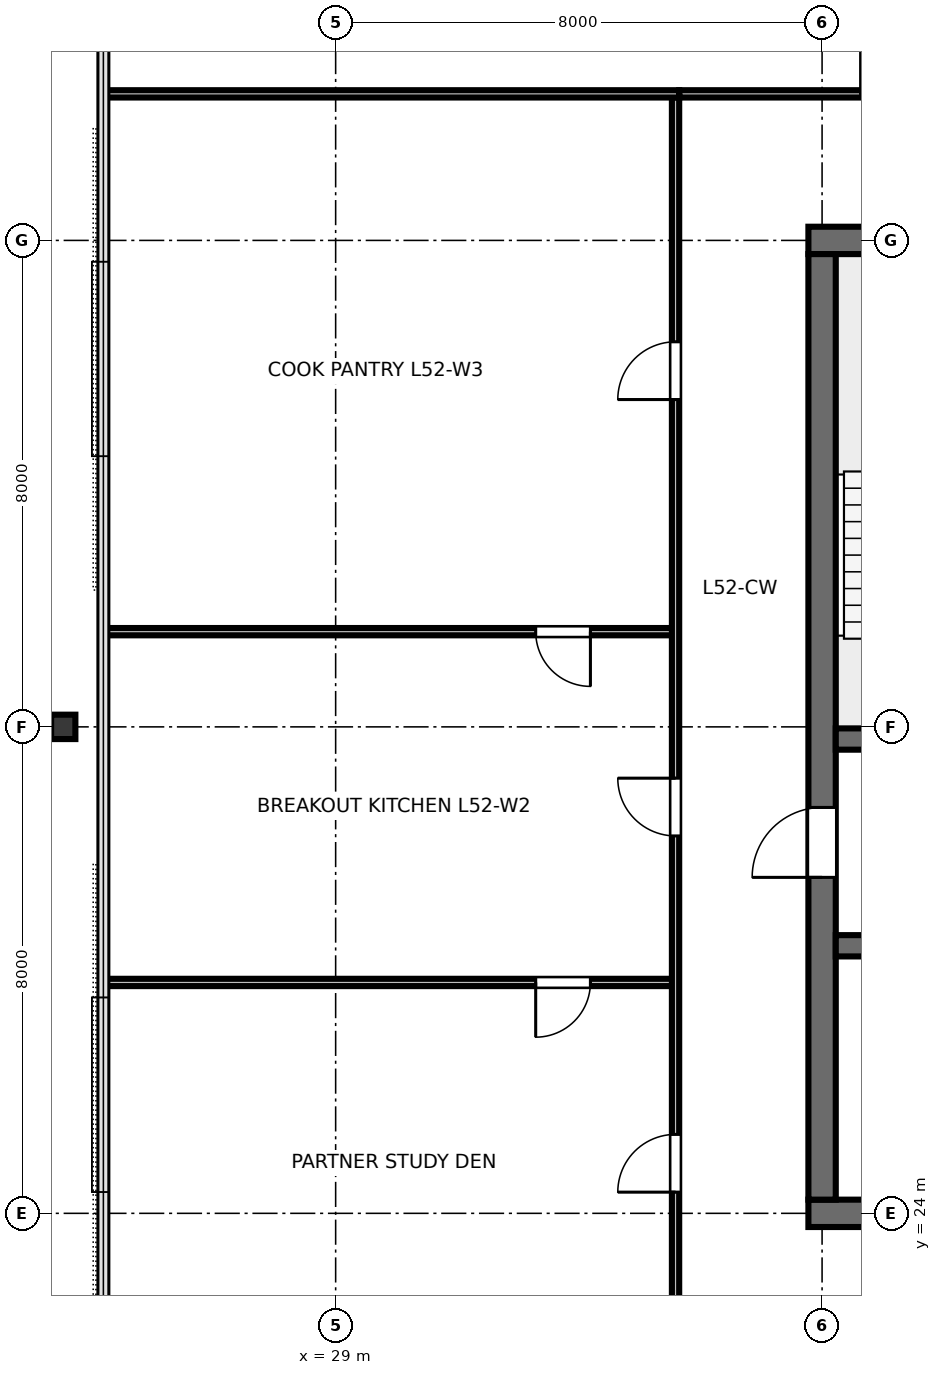
"""IFC4 building model, lengths in metres.
Left out: names, types, materials, properties, quantities, classifications, styles, units other than length and angle.
Written with IfcOpenShell. Run it as: python <this file> out.ifc"""

import sys

from ifc_helpers import new_model, si_unit, direction, frame, frame_2d, origin, origin_2d, place, context, subcontext, project, spatial, rectangle, i_section, extrude, element, fill, save


model = new_model("IFC4")
c1 = context("Model", 3, precision=1e-05, world=origin(), true_north=direction((0.0, 1.0)))
c2 = subcontext(c1, "Body", "Model", "MODEL_VIEW")
j1 = project(units=[si_unit("LENGTHUNIT", "METRE"), si_unit("PLANEANGLEUNIT", "RADIAN")], contexts=[c1])
p1 = place(None, origin())
s1 = spatial("IfcSite", under=j1, at=p1, CompositionType="ELEMENT")
p2 = place(p1, origin())
s2 = spatial("IfcBuilding", under=s1, at=p2, CompositionType="ELEMENT")
p3 = place(p2, frame((0.0, 0.0, 198.6)))
s3 = spatial("IfcBuildingStorey", under=s2, at=p3, CompositionType="ELEMENT", Elevation=198.6)
p4 = place(p3, frame((36.775, 24.0, 0.0), z_axis=(0.0, 0.0, 1.0), x_axis=(1.0, 0.0, 0.0)))
e1 = element("IfcWall", 1, at=p4, inside=s3, PredefinedType="SHEAR", context=c2, shape_type="SweptSolid", body=[
    extrude(rectangle(XDim=18.45, YDim=0.45, at=frame_2d((9.225, 0.0))), origin(), (0.0, 0.0, 1.0), 3.36),
])
p5 = place(p4, frame((13.425, 0.0, 0.0)))
e2 = element("IfcOpeningElement", 2, at=p5, cuts=e1, PredefinedType="OPENING", context=c2, shape_type="SweptSolid", body=[
    extrude(rectangle(XDim=1.6, YDim=2.15, at=frame_2d((0.8, 1.075))), frame((0.0, 0.235, 0.0), z_axis=(0.0, -1.0, 0.0), x_axis=(1.0, 0.0, 0.0)), (0.0, 0.0, 1.0), 0.47),
])
p6 = place(p3, frame((36.775, 40.0, 0.0), z_axis=(0.0, 0.0, 1.0), x_axis=(1.0, 0.0, 0.0)))
e3 = element("IfcWall", 3, at=p6, inside=s3, PredefinedType="SHEAR", context=c2, shape_type="SweptSolid", body=[
    extrude(rectangle(XDim=18.45, YDim=0.45, at=frame_2d((9.225, 0.0))), origin(), (0.0, 0.0, 1.0), 3.36),
])
p7 = place(p6, frame((10.525, 0.0, 0.0)))
e4 = element("IfcOpeningElement", 4, at=p7, cuts=e3, PredefinedType="OPENING", context=c2, shape_type="SweptSolid", body=[
    extrude(rectangle(XDim=1.0, YDim=2.15, at=frame_2d((0.5, 1.075))), frame((0.0, 0.235, 0.0), z_axis=(0.0, -1.0, 0.0), x_axis=(1.0, 0.0, 0.0)), (0.0, 0.0, 1.0), 0.47),
])
p8 = place(p3, frame((37.0, 24.225, 0.0), z_axis=(0.0, 0.0, 1.0), x_axis=(0.0, 1.0, 0.0)))
e5 = element("IfcWall", 5, at=p8, inside=s3, PredefinedType="SHEAR", context=c2, shape_type="SweptSolid", body=[
    extrude(rectangle(XDim=15.55, YDim=0.45, at=frame_2d((7.775, 0.0))), origin(), (0.0, 0.0, 1.0), 3.36),
])
p9 = place(p8, frame((5.3, 0.0, 0.0)))
e6 = element("IfcOpeningElement", 6, at=p9, cuts=e5, PredefinedType="OPENING", context=c2, shape_type="SweptSolid", body=[
    extrude(rectangle(XDim=1.15, YDim=2.15, at=frame_2d((0.575, 1.075))), frame((0.0, 0.235, 0.0), z_axis=(0.0, -1.0, 0.0), x_axis=(1.0, 0.0, 0.0)), (0.0, 0.0, 1.0), 0.47),
])
p10 = place(p3, frame((37.225, 31.8, 0.0), z_axis=(0.0, 0.0, 1.0), x_axis=(1.0, 0.0, 0.0)))
e7 = element("IfcWall", 7, at=p10, inside=s3, PredefinedType="SHEAR", context=c2, shape_type="SweptSolid", body=[
    extrude(rectangle(XDim=17.55, YDim=0.35, at=frame_2d((8.775, 0.0))), origin(), (0.0, 0.0, 1.0), 3.36),
])
p11 = place(p10, frame((0.825, 0.0, 0.0)))
e8 = element("IfcOpeningElement", 8, at=p11, cuts=e7, PredefinedType="OPENING", context=c2, shape_type="SweptSolid", body=[
    extrude(rectangle(XDim=1.1, YDim=2.15, at=frame_2d((0.55, 1.075))), frame((0.0, 0.185, 0.0), z_axis=(0.0, -1.0, 0.0), x_axis=(1.0, 0.0, 0.0)), (0.0, 0.0, 1.0), 0.37),
])
p12 = place(p10, frame((14.725, 0.0, 0.0)))
e9 = element("IfcOpeningElement", 9, at=p12, cuts=e7, PredefinedType="OPENING", context=c2, shape_type="SweptSolid", body=[
    extrude(rectangle(XDim=1.1, YDim=2.15, at=frame_2d((0.55, 1.075))), frame((0.0, 0.185, 0.0), z_axis=(0.0, -1.0, 0.0), x_axis=(1.0, 0.0, 0.0)), (0.0, 0.0, 1.0), 0.37),
])
p13 = place(p3, frame((37.225, 28.4, 0.0), z_axis=(0.0, 0.0, 1.0), x_axis=(1.0, 0.0, 0.0)))
e10 = element("IfcWall", 10, at=p13, inside=s3, PredefinedType="SHEAR", context=c2, shape_type="SweptSolid", body=[
    extrude(rectangle(XDim=17.55, YDim=0.35, at=frame_2d((8.775, 0.0))), origin(), (0.0, 0.0, 1.0), 3.36),
])
p14 = place(p3, frame((24.52, 32.0, 0.0), z_axis=(0.0, 0.0, 1.0), x_axis=(0.0, 1.0, 0.0)))
e11 = element("IfcColumn", 11, at=p14, inside=s3, PredefinedType="COLUMN", context=c2, shape_type="SweptSolid", body=[
    extrude(i_section(OverallWidth=0.401, OverallDepth=0.399, WebThickness=0.025, FlangeThickness=0.04, FilletRadius=0.025, at=origin_2d()), origin(), (0.0, 0.0, 1.0), 3.373),
])
p15 = place(p3, frame((34.65, 42.41, 0.0), z_axis=(0.0, 0.0, 1.0), x_axis=(1.0, 0.0, 0.0)))
e12 = element("IfcWall", 12, at=p15, inside=s3, PredefinedType="PARTITIONING", context=c2, shape_type="SweptSolid", body=[
    extrude(rectangle(XDim=10.33, YDim=0.12, at=frame_2d((5.165, 0.0))), origin(), (0.0, 0.0, 1.0), 2.655),
])
p16 = place(p15, frame((2.984, 0.0, 0.0)))
e13 = element("IfcOpeningElement", 13, at=p16, cuts=e12, PredefinedType="OPENING", context=c2, shape_type="SweptSolid", body=[
    extrude(rectangle(XDim=0.95, YDim=2.15, at=frame_2d((0.475, 1.075))), frame((0.0, 0.07, 0.0), z_axis=(0.0, -1.0, 0.0), x_axis=(1.0, 0.0, 0.0)), (0.0, 0.0, 1.0), 0.14),
])
p17 = place(p15, frame((8.079, 0.0, 0.0)))
e14 = element("IfcOpeningElement", 14, at=p17, cuts=e12, PredefinedType="OPENING", context=c2, shape_type="SweptSolid", body=[
    extrude(rectangle(XDim=0.95, YDim=2.15, at=frame_2d((0.475, 1.075))), frame((0.0, 0.07, 0.0), z_axis=(0.0, -1.0, 0.0), x_axis=(1.0, 0.0, 0.0)), (0.0, 0.0, 1.0), 0.14),
])
p18 = place(p3, frame((34.59, 27.797, 0.0), z_axis=(0.0, 0.0, 1.0), x_axis=(-1.0, 0.0, 0.0)))
e15 = element("IfcWall", 15, at=p18, inside=s3, PredefinedType="PARTITIONING", context=c2, shape_type="SweptSolid", body=[
    extrude(rectangle(XDim=9.41, YDim=0.12, at=frame_2d((4.705, 0.0))), origin(), (0.0, 0.0, 1.0), 2.655),
])
p19 = place(p18, frame((1.4, 0.0, 0.0)))
e16 = element("IfcOpeningElement", 16, at=p19, cuts=e15, PredefinedType="OPENING", context=c2, shape_type="SweptSolid", body=[
    extrude(rectangle(XDim=0.9, YDim=2.15, at=frame_2d((0.45, 1.075))), frame((0.0, 0.07, 0.0), z_axis=(0.0, -1.0, 0.0), x_axis=(1.0, 0.0, 0.0)), (0.0, 0.0, 1.0), 0.14),
])
p20 = place(p3, frame((34.59, 33.566, 0.0), z_axis=(0.0, 0.0, 1.0), x_axis=(-1.0, 0.0, 0.0)))
e17 = element("IfcWall", 17, at=p20, inside=s3, PredefinedType="PARTITIONING", context=c2, shape_type="SweptSolid", body=[
    extrude(rectangle(XDim=9.41, YDim=0.12, at=frame_2d((4.705, 0.0))), origin(), (0.0, 0.0, 1.0), 2.655),
])
p21 = place(p20, frame((1.4, 0.0, 0.0)))
e18 = element("IfcOpeningElement", 18, at=p21, cuts=e17, PredefinedType="OPENING", context=c2, shape_type="SweptSolid", body=[
    extrude(rectangle(XDim=0.9, YDim=2.15, at=frame_2d((0.45, 1.075))), frame((0.0, 0.07, 0.0), z_axis=(0.0, -1.0, 0.0), x_axis=(1.0, 0.0, 0.0)), (0.0, 0.0, 1.0), 0.14),
])
p22 = place(p3, frame((34.59, 21.65, 0.0), z_axis=(0.0, 0.0, 1.0), x_axis=(0.0, 1.0, 0.0)))
e19 = element("IfcWall", 19, at=p22, inside=s3, PredefinedType="PARTITIONING", context=c2, shape_type="SweptSolid", body=[
    extrude(rectangle(XDim=20.7, YDim=0.12, at=frame_2d((10.35, 0.0))), origin(), (0.0, 0.0, 1.0), 2.655),
])
p23 = place(p22, frame((2.698, 0.0, 0.0)))
e20 = element("IfcOpeningElement", 20, at=p23, cuts=e19, PredefinedType="OPENING", context=c2, shape_type="SweptSolid", body=[
    extrude(rectangle(XDim=0.95, YDim=2.15, at=frame_2d((0.475, 1.075))), frame((0.0, 0.07, 0.0), z_axis=(0.0, -1.0, 0.0), x_axis=(1.0, 0.0, 0.0)), (0.0, 0.0, 1.0), 0.14),
])
p24 = place(p22, frame((8.556, 0.0, 0.0)))
e21 = element("IfcOpeningElement", 21, at=p24, cuts=e19, PredefinedType="OPENING", context=c2, shape_type="SweptSolid", body=[
    extrude(rectangle(XDim=0.95, YDim=2.15, at=frame_2d((0.475, 1.075))), frame((0.0, 0.07, 0.0), z_axis=(0.0, -1.0, 0.0), x_axis=(1.0, 0.0, 0.0)), (0.0, 0.0, 1.0), 0.14),
])
p25 = place(p22, frame((15.733, 0.0, 0.0)))
e22 = element("IfcOpeningElement", 22, at=p25, cuts=e19, PredefinedType="OPENING", context=c2, shape_type="SweptSolid", body=[
    extrude(rectangle(XDim=0.95, YDim=2.15, at=frame_2d((0.475, 1.075))), frame((0.0, 0.07, 0.0), z_axis=(0.0, -1.0, 0.0), x_axis=(1.0, 0.0, 0.0)), (0.0, 0.0, 1.0), 0.14),
])
p26 = place(p3, frame((34.65, 42.41, 0.0), z_axis=(0.0, 0.0, 1.0), x_axis=(-1.0, 0.0, 0.0)))
e23 = element("IfcWall", 23, at=p26, inside=s3, PredefinedType="PARTITIONING", context=c2, shape_type="SweptSolid", body=[
    extrude(rectangle(XDim=9.47, YDim=0.12, at=frame_2d((4.735, 0.0))), origin(), (0.0, 0.0, 1.0), 2.655),
])
p27 = place(p9, origin())
e24 = element("IfcDoor", 24, at=p27, inside=s3, OperationType="SINGLE_SWING_LEFT", PredefinedType="DOOR", context=c2, shape_type="SweptSolid", body=[
    extrude(rectangle(XDim=1.15, YDim=2.15, at=frame_2d((0.575, 1.075))), frame((0.0, 0.025, 0.0), z_axis=(0.0, -1.0, 0.0), x_axis=(1.0, 0.0, 0.0)), (0.0, 0.0, 1.0), 0.05),
])
fill(e6, e24)
p28 = place(p16, origin())
e25 = element("IfcDoor", 25, at=p28, inside=s3, OperationType="SINGLE_SWING_LEFT", PredefinedType="DOOR", context=c2, shape_type="SweptSolid", body=[
    extrude(rectangle(XDim=0.95, YDim=2.15, at=frame_2d((0.475, 1.075))), frame((0.0, 0.025, 0.0), z_axis=(0.0, -1.0, 0.0), x_axis=(1.0, 0.0, 0.0)), (0.0, 0.0, 1.0), 0.05),
])
fill(e13, e25)
p29 = place(p19, origin())
e26 = element("IfcDoor", 26, at=p29, inside=s3, OperationType="SINGLE_SWING_RIGHT", PredefinedType="DOOR", context=c2, shape_type="SweptSolid", body=[
    extrude(rectangle(XDim=0.9, YDim=2.15, at=frame_2d((0.45, 1.075))), frame((0.0, 0.025, 0.0), z_axis=(0.0, -1.0, 0.0), x_axis=(1.0, 0.0, 0.0)), (0.0, 0.0, 1.0), 0.05),
])
fill(e16, e26)
p30 = place(p21, origin())
e27 = element("IfcDoor", 27, at=p30, inside=s3, OperationType="SINGLE_SWING_LEFT", PredefinedType="DOOR", context=c2, shape_type="SweptSolid", body=[
    extrude(rectangle(XDim=0.9, YDim=2.15, at=frame_2d((0.45, 1.075))), frame((0.0, 0.025, 0.0), z_axis=(0.0, -1.0, 0.0), x_axis=(1.0, 0.0, 0.0)), (0.0, 0.0, 1.0), 0.05),
])
fill(e18, e27)
p31 = place(p23, origin())
e28 = element("IfcDoor", 28, at=p31, inside=s3, OperationType="SINGLE_SWING_LEFT", PredefinedType="DOOR", context=c2, shape_type="SweptSolid", body=[
    extrude(rectangle(XDim=0.95, YDim=2.15, at=frame_2d((0.475, 1.075))), frame((0.0, 0.025, 0.0), z_axis=(0.0, -1.0, 0.0), x_axis=(1.0, 0.0, 0.0)), (0.0, 0.0, 1.0), 0.05),
])
fill(e20, e28)
p32 = place(p24, origin())
e29 = element("IfcDoor", 29, at=p32, inside=s3, OperationType="SINGLE_SWING_RIGHT", PredefinedType="DOOR", context=c2, shape_type="SweptSolid", body=[
    extrude(rectangle(XDim=0.95, YDim=2.15, at=frame_2d((0.475, 1.075))), frame((0.0, 0.025, 0.0), z_axis=(0.0, -1.0, 0.0), x_axis=(1.0, 0.0, 0.0)), (0.0, 0.0, 1.0), 0.05),
])
fill(e21, e29)
p33 = place(p25, origin())
e30 = element("IfcDoor", 30, at=p33, inside=s3, OperationType="SINGLE_SWING_LEFT", PredefinedType="DOOR", context=c2, shape_type="SweptSolid", body=[
    extrude(rectangle(XDim=0.95, YDim=2.15, at=frame_2d((0.475, 1.075))), frame((0.0, 0.025, 0.0), z_axis=(0.0, -1.0, 0.0), x_axis=(1.0, 0.0, 0.0)), (0.0, 0.0, 1.0), 0.05),
])
fill(e22, e30)
save(model, sys.argv[1])
